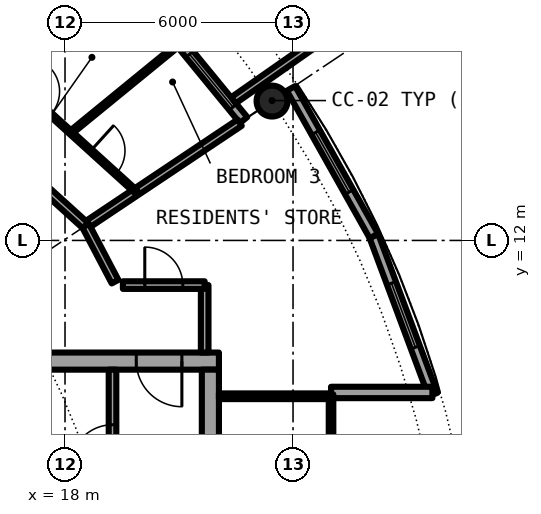
"""IFC4 building model, lengths in metres.
Left out: names, types, materials, properties, quantities, classifications, styles, units other than length and angle.
Written with IfcOpenShell. Run it as: python <this file> out.ifc"""

import sys

from ifc_helpers import new_model, si_unit, direction, frame, frame_2d, origin, origin_2d, place, context, subcontext, project, spatial, rectangle, hollow_circle, extrude, element, fill, save


model = new_model("IFC4")
c1 = context("Model", 3, precision=1e-05, world=origin(), true_north=direction((0.0, 1.0)))
c2 = subcontext(c1, "Body", "Model", "MODEL_VIEW")
j1 = project(units=[si_unit("LENGTHUNIT", "METRE"), si_unit("PLANEANGLEUNIT", "RADIAN")], contexts=[c1])
p1 = place(None, origin())
s1 = spatial("IfcSite", under=j1, at=p1, CompositionType="ELEMENT")
p2 = place(p1, origin())
s2 = spatial("IfcBuilding", under=s1, at=p2, CompositionType="ELEMENT")
p3 = place(p2, frame((0.0, 0.0, 199.35)))
s3 = spatial("IfcBuildingStorey", under=s2, at=p3, CompositionType="ELEMENT", Elevation=199.35)
p4 = place(p3, frame((23.448, 15.667, 0.0), z_axis=(0.0, 0.0, 1.0), x_axis=(1.0, 0.0, 0.0)))
e1 = element("IfcColumn", 1, at=p4, inside=s3, PredefinedType="COLUMN", context=c2, shape_type="SweptSolid", body=[
    extrude(hollow_circle(Radius=0.406, WallThickness=0.03, at=origin_2d()), origin(), (0.0, 0.0, 1.0), 3.05),
])
p5 = place(p3, frame((22.699, 15.167, 0.0), z_axis=(0.0, 0.0, 1.0), x_axis=(-0.634382322723, 0.773019449054, 0.0)))
e2 = element("IfcWall", 2, at=p5, inside=s3, PredefinedType="SOLIDWALL", context=c2, shape_type="SweptSolid", body=[
    extrude(rectangle(XDim=5.352, YDim=0.25, at=frame_2d((2.676, 0.0))), origin(), (0.0, 0.0, 1.0), 2.7),
])
p6 = place(p5, frame((0.441, 0.0, 0.3)))
e3 = element("IfcOpeningElement", 3, at=p6, cuts=e2, PredefinedType="OPENING", context=c2, shape_type="SweptSolid", body=[
    extrude(rectangle(XDim=1.8, YDim=2.1, at=frame_2d((0.9, 1.05))), frame((0.0, 0.135, 0.0), z_axis=(0.0, -1.0, 0.0), x_axis=(1.0, 0.0, 0.0)), (0.0, 0.0, 1.0), 0.27),
])
p7 = place(p5, frame((3.51, 0.0, 0.0)))
e4 = element("IfcOpeningElement", 4, at=p7, cuts=e2, PredefinedType="OPENING", context=c2, shape_type="SweptSolid", body=[
    extrude(rectangle(XDim=1.0, YDim=2.2, at=frame_2d((0.5, 1.1))), frame((0.0, 0.135, 0.0), z_axis=(0.0, -1.0, 0.0), x_axis=(1.0, 0.0, 0.0)), (0.0, 0.0, 1.0), 0.27),
])
p8 = place(p3, frame((22.433, 15.688, -0.03), z_axis=(0.0, 0.0, 1.0), x_axis=(0.819373043115, 0.573260687834, 0.0)))
e5 = element("IfcWall", 5, at=p8, inside=s3, PredefinedType="SOLIDWALL", context=c2, shape_type="SweptSolid", body=[
    extrude(rectangle(XDim=2.925, YDim=0.2, at=frame_2d((1.463, 0.0))), origin(), (0.0, 0.0, 1.0), 2.73),
])
p9 = place(p3, frame((27.682, 7.945, 0.0), z_axis=(0.0, 0.0, 1.0), x_axis=(-0.349247811493, 0.937030397675, 0.0)))
e6 = element("IfcWall", 6, at=p9, inside=s3, PredefinedType="SOLIDWALL", context=c2, shape_type="SweptSolid", body=[
    extrude(rectangle(XDim=4.452, YDim=0.25, at=frame_2d((2.226, 0.0))), origin(), (0.0, 0.0, 1.0), 2.7),
])
p10 = place(p9, frame((1.327, 0.0, 0.3)))
e7 = element("IfcOpeningElement", 7, at=p10, cuts=e6, PredefinedType="OPENING", context=c2, shape_type="SweptSolid", body=[
    extrude(rectangle(XDim=1.8, YDim=2.1, at=frame_2d((0.9, 1.05))), frame((0.0, 0.135, 0.0), z_axis=(0.0, -1.0, 0.0), x_axis=(1.0, 0.0, 0.0)), (0.0, 0.0, 1.0), 0.27),
])
p11 = place(p3, frame((26.127, 12.117, 0.0), z_axis=(0.0, 0.0, 1.0), x_axis=(-0.489696356642, 0.871893042919, 0.0)))
e8 = element("IfcWall", 8, at=p11, inside=s3, PredefinedType="SOLIDWALL", context=c2, shape_type="SweptSolid", body=[
    extrude(rectangle(XDim=4.454, YDim=0.25, at=frame_2d((2.227, 0.0))), origin(), (0.0, 0.0, 1.0), 2.7),
])
p12 = place(p11, frame((1.327, 0.0, 0.3)))
e9 = element("IfcOpeningElement", 9, at=p12, cuts=e8, PredefinedType="OPENING", context=c2, shape_type="SweptSolid", body=[
    extrude(rectangle(XDim=1.8, YDim=2.1, at=frame_2d((0.9, 1.05))), frame((0.0, 0.135, 0.0), z_axis=(0.0, -1.0, 0.0), x_axis=(1.0, 0.0, 0.0)), (0.0, 0.0, 1.0), 0.27),
])
p13 = place(p3, frame((25.0, 8.0, 0.0), z_axis=(0.0, 0.0, 1.0), x_axis=(1.0, 0.0, 0.0)))
e10 = element("IfcWall", 10, at=p13, inside=s3, PredefinedType="SOLIDWALL", context=c2, shape_type="SweptSolid", body=[
    extrude(rectangle(XDim=2.667, YDim=0.3, at=frame_2d((1.333, 0.0))), origin(), (0.0, 0.0, 1.0), 2.7),
])
p14 = place(p3, frame((22.05, 8.825, 0.0), z_axis=(0.0, 0.0, 1.0), x_axis=(-1.0, 0.0, 0.0)))
e11 = element("IfcWall", 11, at=p14, inside=s3, PredefinedType="SHEAR", context=c2, shape_type="SweptSolid", body=[
    extrude(rectangle(XDim=13.5, YDim=0.45, at=frame_2d((6.75, 0.0))), origin(), (0.0, 0.0, 1.0), 3.05),
])
p15 = place(p14, frame((0.975, 0.0, 0.0)))
e12 = element("IfcOpeningElement", 12, at=p15, cuts=e11, PredefinedType="OPENING", context=c2, shape_type="SweptSolid", body=[
    extrude(rectangle(XDim=1.2, YDim=2.3, at=frame_2d((0.6, 1.15))), frame((0.0, 0.235, 0.0), z_axis=(0.0, -1.0, 0.0), x_axis=(1.0, 0.0, 0.0)), (0.0, 0.0, 1.0), 0.47),
])
p16 = place(p3, frame((21.825, 8.6, 0.0), z_axis=(0.0, 0.0, 1.0), x_axis=(0.0, -1.0, 0.0)))
e13 = element("IfcWall", 13, at=p16, inside=s3, PredefinedType="SHEAR", context=c2, shape_type="SweptSolid", body=[
    extrude(rectangle(XDim=17.2, YDim=0.45, at=frame_2d((8.6, 0.0))), origin(), (0.0, 0.0, 1.0), 3.05),
])
p17 = place(p16, frame((7.7, 0.0, 0.0)))
e14 = element("IfcOpeningElement", 14, at=p17, cuts=e13, PredefinedType="OPENING", context=c2, shape_type="SweptSolid", body=[
    extrude(rectangle(XDim=1.8, YDim=2.3, at=frame_2d((0.9, 1.15))), frame((0.0, 0.235, 0.0), z_axis=(0.0, -1.0, 0.0), x_axis=(1.0, 0.0, 0.0)), (0.0, 0.0, 1.0), 0.47),
])
p18 = place(p3, frame((19.25, 1.575, 0.0), z_axis=(0.0, 0.0, 1.0), x_axis=(0.0, 1.0, 0.0)))
e15 = element("IfcWall", 15, at=p18, inside=s3, PredefinedType="SOLIDWALL", context=c2, shape_type="SweptSolid", body=[
    extrude(rectangle(XDim=7.025, YDim=0.2, at=frame_2d((3.513, 0.0))), origin(), (0.0, 0.0, 1.0), 2.7),
])
p19 = place(p18, frame((4.475, 0.0, 0.0)))
e16 = element("IfcOpeningElement", 16, at=p19, cuts=e15, PredefinedType="OPENING", context=c2, shape_type="SweptSolid", body=[
    extrude(rectangle(XDim=1.1, YDim=2.3, at=frame_2d((0.55, 1.15))), frame((0.0, 0.11, 0.0), z_axis=(0.0, -1.0, 0.0), x_axis=(1.0, 0.0, 0.0)), (0.0, 0.0, 1.0), 0.22),
])
p20 = place(p3, frame((22.05, 7.9, 0.0), z_axis=(0.0, 0.0, 1.0), x_axis=(1.0, 0.0, 0.0)))
e17 = element("IfcWall", 17, at=p20, inside=s3, PredefinedType="PARTITIONING", context=c2, shape_type="SweptSolid", body=[
    extrude(rectangle(XDim=2.89, YDim=0.15, at=frame_2d((1.445, 0.0))), origin(), (0.0, 0.0, 1.0), 2.7),
])
p21 = place(p3, frame((25.0, -7.95, 0.0), z_axis=(0.0, 0.0, 1.0), x_axis=(0.0, 1.0, 0.0)))
e18 = element("IfcWall", 18, at=p21, inside=s3, PredefinedType="PARTITIONING", context=c2, shape_type="SweptSolid", body=[
    extrude(rectangle(XDim=15.9, YDim=0.12, at=frame_2d((7.95, 0.0))), origin(), (0.0, 0.0, 1.0), 2.7),
])
p22 = place(p21, frame((0.95, 0.0, 0.1)))
e19 = element("IfcOpeningElement", 19, at=p22, cuts=e18, PredefinedType="OPENING", context=c2, shape_type="SweptSolid", body=[
    extrude(rectangle(XDim=14.0, YDim=2.35, at=frame_2d((7.0, 1.175))), frame((0.0, 0.07, 0.0), z_axis=(0.0, -1.0, 0.0), x_axis=(1.0, 0.0, 0.0)), (0.0, 0.0, 1.0), 0.14),
])
p23 = place(p3, frame((21.675, 9.05, 0.0), z_axis=(0.0, 0.0, 1.0), x_axis=(0.0, 1.0, 0.0)))
e20 = element("IfcWall", 20, at=p23, inside=s3, PredefinedType="PARTITIONING", context=c2, shape_type="SweptSolid", body=[
    extrude(rectangle(XDim=1.775, YDim=0.2, at=frame_2d((0.887, 0.0))), origin(), (0.0, 0.0, 1.0), 2.7),
])
p24 = place(p3, frame((16.43, 16.398, 0.0), z_axis=(0.0, 0.0, 1.0), x_axis=(0.707722727509, 0.706490297858, 0.0)))
e21 = element("IfcWall", 21, at=p24, inside=s3, PredefinedType="PARTITIONING", context=c2, shape_type="SweptSolid", body=[
    extrude(rectangle(XDim=3.962, YDim=0.1, at=frame_2d((1.981, 0.0))), origin(), (0.0, 0.0, 1.0), 2.7),
])
p25 = place(p3, frame((18.151, 14.838, 0.0), z_axis=(0.0, 0.0, 1.0), x_axis=(0.774321581607, 0.63279229472, 0.0)))
e22 = element("IfcWall", 22, at=p25, inside=s3, PredefinedType="PARTITIONING", context=c2, shape_type="SweptSolid", body=[
    extrude(rectangle(XDim=3.731, YDim=0.1, at=frame_2d((1.866, 0.0))), origin(), (0.0, 0.0, 1.0), 2.7),
])
p26 = place(p3, frame((18.542, 12.389, 0.0), z_axis=(0.0, 0.0, 1.0), x_axis=(0.831387096605, 0.55569370664, 0.0)))
e23 = element("IfcWall", 23, at=p26, inside=s3, PredefinedType="PARTITIONING", context=c2, shape_type="SweptSolid", body=[
    extrude(rectangle(XDim=4.875, YDim=0.2, at=frame_2d((2.438, 0.0))), origin(), (0.0, 0.0, 1.0), 2.7),
])
p27 = place(p3, frame((19.523, 10.825, 0.0), z_axis=(0.0, 0.0, 1.0), x_axis=(1.0, 0.0, 0.0)))
e24 = element("IfcWall", 24, at=p27, inside=s3, PredefinedType="PARTITIONING", context=c2, shape_type="SweptSolid", body=[
    extrude(rectangle(XDim=2.152, YDim=0.2, at=frame_2d((1.076, 0.0))), origin(), (0.0, 0.0, 1.0), 2.7),
])
p28 = place(p27, frame((0.576, 0.0, 0.0)))
e25 = element("IfcOpeningElement", 25, at=p28, cuts=e24, PredefinedType="OPENING", context=c2, shape_type="SweptSolid", body=[
    extrude(rectangle(XDim=1.0, YDim=2.3, at=frame_2d((0.5, 1.15))), frame((0.0, 0.11, 0.0), z_axis=(0.0, -1.0, 0.0), x_axis=(1.0, 0.0, 0.0)), (0.0, 0.0, 1.0), 0.22),
])
p29 = place(p3, frame((10.512, 19.667, 0.0), z_axis=(0.0, 0.0, 1.0), x_axis=(0.740849323054, -0.67167125927, 0.0)))
e26 = element("IfcWall", 26, at=p29, inside=s3, PredefinedType="PARTITIONING", context=c2, shape_type="SweptSolid", body=[
    extrude(rectangle(XDim=10.842, YDim=0.2, at=frame_2d((5.421, 0.0))), origin(), (0.0, 0.0, 1.0), 2.7),
])
p30 = place(p29, frame((6.003, 0.0, 0.0)))
e27 = element("IfcOpeningElement", 27, at=p30, cuts=e26, PredefinedType="OPENING", context=c2, shape_type="SweptSolid", body=[
    extrude(rectangle(XDim=1.0, YDim=2.3, at=frame_2d((0.5, 1.15))), frame((0.0, 0.11, 0.0), z_axis=(0.0, -1.0, 0.0), x_axis=(1.0, 0.0, 0.0)), (0.0, 0.0, 1.0), 0.22),
])
p31 = place(p3, frame((18.542, 12.389, 0.0), z_axis=(0.0, 0.0, 1.0), x_axis=(0.465359652486, -0.885121683068, 0.0)))
e28 = element("IfcWall", 28, at=p31, inside=s3, PredefinedType="PARTITIONING", context=c2, shape_type="SweptSolid", body=[
    extrude(rectangle(XDim=1.665, YDim=0.2, at=frame_2d((0.833, 0.0))), origin(), (0.0, 0.0, 1.0), 2.7),
])
p32 = place(p3, frame((14.709, 17.958, 0.0), z_axis=(0.0, 0.0, 1.0), x_axis=(0.740923753351, -0.671589153962, 0.0)))
e29 = element("IfcWall", 29, at=p32, inside=s3, PredefinedType="PARTITIONING", context=c2, shape_type="SweptSolid", body=[
    extrude(rectangle(XDim=6.969, YDim=0.1, at=frame_2d((3.484, 0.0))), origin(), (0.0, 0.0, 1.0), 2.7),
])
p33 = place(p32, frame((3.034, 0.0, 0.0)))
e30 = element("IfcOpeningElement", 30, at=p33, cuts=e29, PredefinedType="OPENING", context=c2, shape_type="SweptSolid", body=[
    extrude(rectangle(XDim=0.9, YDim=2.3, at=frame_2d((0.45, 1.15))), frame((0.0, 0.06, 0.0), z_axis=(0.0, -1.0, 0.0), x_axis=(1.0, 0.0, 0.0)), (0.0, 0.0, 1.0), 0.12),
])
p34 = place(p32, frame((5.357, 0.0, 0.0)))
e31 = element("IfcOpeningElement", 31, at=p34, cuts=e29, PredefinedType="OPENING", context=c2, shape_type="SweptSolid", body=[
    extrude(rectangle(XDim=0.9, YDim=2.3, at=frame_2d((0.45, 1.15))), frame((0.0, 0.06, 0.0), z_axis=(0.0, -1.0, 0.0), x_axis=(1.0, 0.0, 0.0)), (0.0, 0.0, 1.0), 0.12),
])
p35 = place(p6, origin())
e32 = element("IfcWindow", 32, at=p35, inside=s3, PartitioningType="SINGLE_PANEL", PredefinedType="WINDOW", context=c2, shape_type="SweptSolid", body=[
    extrude(rectangle(XDim=1.8, YDim=2.1, at=frame_2d((0.9, 1.05))), frame((0.0, 0.03, 0.0), z_axis=(0.0, -1.0, 0.0), x_axis=(1.0, 0.0, 0.0)), (0.0, 0.0, 1.0), 0.06),
])
fill(e3, e32)
p36 = place(p10, origin())
e33 = element("IfcWindow", 33, at=p36, inside=s3, PartitioningType="SINGLE_PANEL", PredefinedType="WINDOW", context=c2, shape_type="SweptSolid", body=[
    extrude(rectangle(XDim=1.8, YDim=2.1, at=frame_2d((0.9, 1.05))), frame((0.0, 0.03, 0.0), z_axis=(0.0, -1.0, 0.0), x_axis=(1.0, 0.0, 0.0)), (0.0, 0.0, 1.0), 0.06),
])
fill(e7, e33)
p37 = place(p12, origin())
e34 = element("IfcWindow", 34, at=p37, inside=s3, PartitioningType="SINGLE_PANEL", PredefinedType="WINDOW", context=c2, shape_type="SweptSolid", body=[
    extrude(rectangle(XDim=1.8, YDim=2.1, at=frame_2d((0.9, 1.05))), frame((0.0, 0.03, 0.0), z_axis=(0.0, -1.0, 0.0), x_axis=(1.0, 0.0, 0.0)), (0.0, 0.0, 1.0), 0.06),
])
fill(e9, e34)
p38 = place(p19, origin())
e35 = element("IfcDoor", 35, at=p38, inside=s3, OperationType="SINGLE_SWING_LEFT", PredefinedType="DOOR", context=c2, shape_type="SweptSolid", body=[
    extrude(rectangle(XDim=1.1, YDim=2.3, at=frame_2d((0.55, 1.15))), frame((0.0, 0.025, 0.0), z_axis=(0.0, -1.0, 0.0), x_axis=(1.0, 0.0, 0.0)), (0.0, 0.0, 1.0), 0.05),
])
fill(e16, e35)
p39 = place(p15, origin())
e36 = element("IfcDoor", 36, at=p39, inside=s3, OperationType="SINGLE_SWING_RIGHT", PredefinedType="DOOR", context=c2, shape_type="SweptSolid", body=[
    extrude(rectangle(XDim=1.2, YDim=2.3, at=frame_2d((0.6, 1.15))), frame((0.0, 0.025, 0.0), z_axis=(0.0, -1.0, 0.0), x_axis=(1.0, 0.0, 0.0)), (0.0, 0.0, 1.0), 0.05),
])
fill(e12, e36)
p40 = place(p22, origin())
e37 = element("IfcWindow", 37, at=p40, inside=s3, PartitioningType="SINGLE_PANEL", PredefinedType="WINDOW", context=c2, shape_type="SweptSolid", body=[
    extrude(rectangle(XDim=14.0, YDim=2.35, at=frame_2d((7.0, 1.175))), frame((0.0, 0.03, 0.0), z_axis=(0.0, -1.0, 0.0), x_axis=(1.0, 0.0, 0.0)), (0.0, 0.0, 1.0), 0.06),
])
fill(e19, e37)
p41 = place(p34, origin())
e38 = element("IfcDoor", 38, at=p41, inside=s3, OperationType="SINGLE_SWING_RIGHT", PredefinedType="DOOR", context=c2, shape_type="SweptSolid", body=[
    extrude(rectangle(XDim=0.9, YDim=2.3, at=frame_2d((0.45, 1.15))), frame((0.0, 0.025, 0.0), z_axis=(0.0, -1.0, 0.0), x_axis=(1.0, 0.0, 0.0)), (0.0, 0.0, 1.0), 0.05),
])
fill(e31, e38)
p42 = place(p28, origin())
e39 = element("IfcDoor", 39, at=p42, inside=s3, OperationType="SINGLE_SWING_LEFT", PredefinedType="DOOR", context=c2, shape_type="SweptSolid", body=[
    extrude(rectangle(XDim=1.0, YDim=2.3, at=frame_2d((0.5, 1.15))), frame((0.0, 0.025, 0.0), z_axis=(0.0, -1.0, 0.0), x_axis=(1.0, 0.0, 0.0)), (0.0, 0.0, 1.0), 0.05),
])
fill(e25, e39)
save(model, sys.argv[1])
